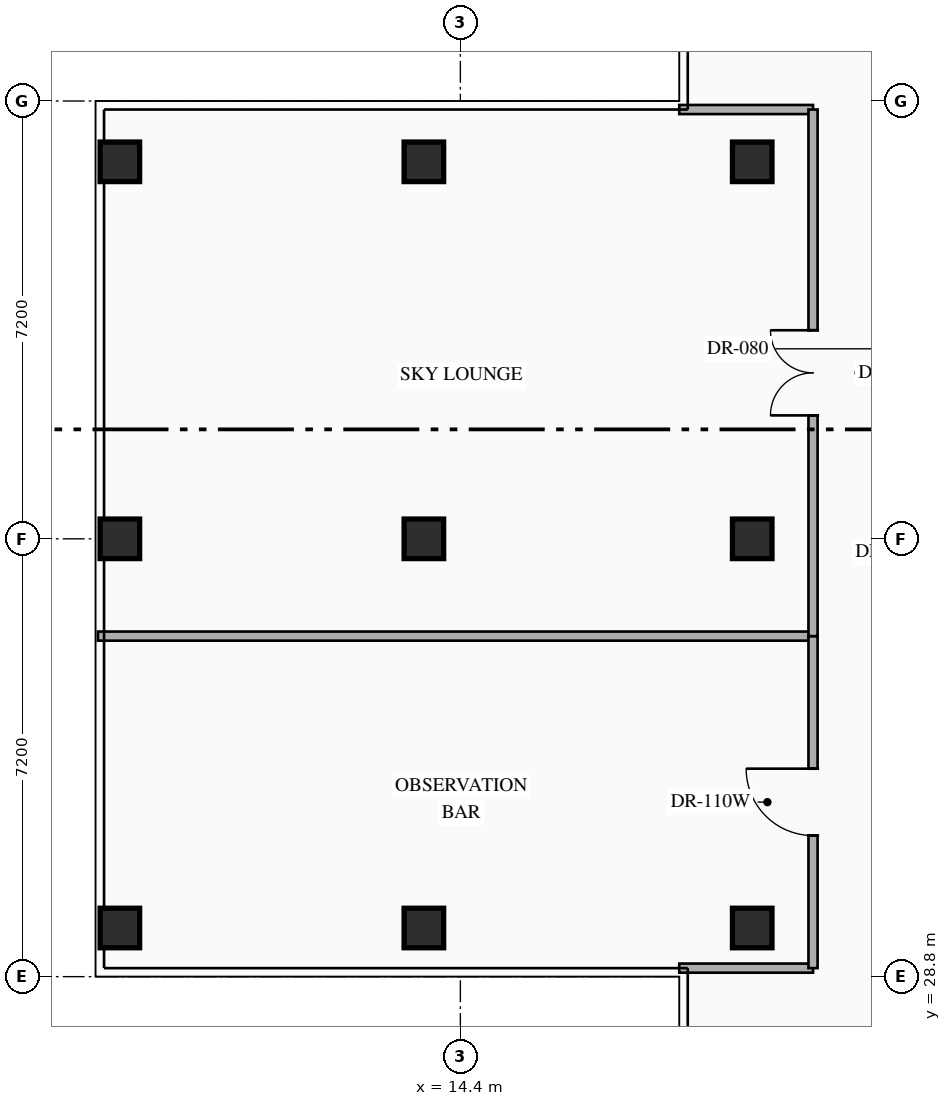
"""IFC4 building model, lengths in metres.
Left out: names, types, materials, properties, quantities, classifications, styles, units other than length and angle.
Written with IfcOpenShell. Run it as: python <this file> out.ifc"""

import sys

from ifc_helpers import new_model, si_unit, direction, frame, frame_2d, origin, origin_2d, place, context, subcontext, project, spatial, rectangle, hollow_rectangle, extrude, element, fill, save


model = new_model("IFC4")
c1 = context("Model", 3, precision=1e-05, world=origin(), true_north=direction((0.0, 1.0)))
c2 = subcontext(c1, "Body", "Model", "MODEL_VIEW")
j1 = project(units=[si_unit("LENGTHUNIT", "METRE"), si_unit("PLANEANGLEUNIT", "RADIAN")], contexts=[c1])
p1 = place(None, origin())
s1 = spatial("IfcSite", under=j1, at=p1, CompositionType="ELEMENT")
p2 = place(p1, origin())
s2 = spatial("IfcBuilding", under=s1, at=p2, CompositionType="ELEMENT")
p3 = place(p2, frame((0.0, 0.0, 261.75)))
s3 = spatial("IfcBuildingStorey", under=s2, at=p3, CompositionType="ELEMENT", Elevation=261.75)
for number, where, z_axis, x_axis in (
    (1, (19.2, 29.6, 0.0), (0.0, 0.0, 1.0), (1.0, 0.0, 0.0)),
    (2, (19.2, 42.2, 0.0), (0.0, 0.0, 1.0), (1.0, 0.0, 0.0)),
    (3, (19.2, 36.0, 0.0), (0.0, 0.0, 1.0), (1.0, 0.0, 0.0)),
):
    element("IfcColumn", number, at=place(p3, frame(where, z_axis=z_axis, x_axis=x_axis)), inside=s3, PredefinedType="COLUMN", context=c2, shape_type="SweptSolid", body=[
        extrude(hollow_rectangle(XDim=0.65, YDim=0.65, WallThickness=0.025, at=origin_2d()), origin(), (0.0, 0.0, 1.0), 4.2),
    ])
for number, where, z_axis, x_axis in (
    (4, (13.8, 29.6, 0.0), (0.0, 0.0, 1.0), (1.0, 0.0, 0.0)),
    (5, (8.8, 29.6, 0.0), (0.0, 0.0, 1.0), (1.0, 0.0, 0.0)),
    (6, (13.8, 36.0, 0.0), (0.0, 0.0, 1.0), (1.0, 0.0, 0.0)),
    (7, (8.8, 36.0, 0.0), (0.0, 0.0, 1.0), (1.0, 0.0, 0.0)),
    (8, (13.8, 42.2, 0.0), (0.0, 0.0, 1.0), (1.0, 0.0, 0.0)),
    (9, (8.8, 42.2, 0.0), (0.0, 0.0, 1.0), (1.0, 0.0, 0.0)),
):
    element("IfcColumn", number, at=place(p3, frame(where, z_axis=z_axis, x_axis=x_axis)), inside=s3, PredefinedType="COLUMN", context=c2, shape_type="SweptSolid", body=[
        extrude(hollow_rectangle(XDim=0.65, YDim=0.65, WallThickness=0.025, at=origin_2d()), origin(), (0.0, 0.0, 1.0), 3.918),
    ])
for number, where, z_axis, x_axis in (
    (10, (18.0, 28.94, 0.0), (0.0, 0.0, 1.0), (1.0, 0.0, 0.0)),
    (11, (18.0, 43.06, 0.0), (0.0, 0.0, 1.0), (1.0, 0.0, 0.0)),
):
    element("IfcWall", number, at=place(p3, frame(where, z_axis=z_axis, x_axis=x_axis)), inside=s3, PredefinedType="PARTITIONING", context=c2, shape_type="SweptSolid", body=[
        extrude(rectangle(XDim=2.2, YDim=0.15, at=frame_2d((1.1, 0.0))), origin(), (0.0, 0.0, 1.0), 3.94),
    ])
p4 = place(p3, frame((8.44, 34.4, 0.0), z_axis=(0.0, 0.0, 1.0), x_axis=(1.0, 0.0, 0.0)))
e12 = element("IfcWall", 12, at=p4, inside=s3, PredefinedType="PARTITIONING", context=c2, shape_type="SweptSolid", body=[
    extrude(rectangle(XDim=11.76, YDim=0.15, at=frame_2d((5.88, 0.0))), origin(), (0.0, 0.0, 1.0), 3.94),
])
p5 = place(p3, frame((20.2, 28.94, 0.0), z_axis=(0.0, 0.0, 1.0), x_axis=(0.0, 1.0, 0.0)))
e13 = element("IfcWall", 13, at=p5, inside=s3, PredefinedType="PARTITIONING", context=c2, shape_type="SweptSolid", body=[
    extrude(rectangle(XDim=5.46, YDim=0.15, at=frame_2d((2.73, 0.0))), origin(), (0.0, 0.0, 1.0), 3.94),
])
p6 = place(p5, frame((2.18, 0.0, 0.0)))
e14 = element("IfcOpeningElement", 14, at=p6, cuts=e13, PredefinedType="OPENING", context=c2, shape_type="SweptSolid", body=[
    extrude(rectangle(XDim=1.1, YDim=2.16, at=frame_2d((0.55, 1.08))), frame((0.0, 0.085, 0.0), z_axis=(0.0, -1.0, 0.0), x_axis=(1.0, 0.0, 0.0)), (0.0, 0.0, 1.0), 0.17),
])
p7 = place(p3, frame((20.2, 34.4, 0.0), z_axis=(0.0, 0.0, 1.0), x_axis=(0.0, 1.0, 0.0)))
e15 = element("IfcWall", 15, at=p7, inside=s3, PredefinedType="PARTITIONING", context=c2, shape_type="SweptSolid", body=[
    extrude(rectangle(XDim=8.66, YDim=0.15, at=frame_2d((4.33, 0.0))), origin(), (0.0, 0.0, 1.0), 3.94),
])
p8 = place(p7, frame((3.63, 0.0, 0.0)))
e16 = element("IfcOpeningElement", 16, at=p8, cuts=e15, PredefinedType="OPENING", context=c2, shape_type="SweptSolid", body=[
    extrude(rectangle(XDim=1.4, YDim=2.3, at=frame_2d((0.7, 1.15))), frame((0.0, 0.085, 0.0), z_axis=(0.0, -1.0, 0.0), x_axis=(1.0, 0.0, 0.0)), (0.0, 0.0, 1.0), 0.17),
])
p9 = place(p6, origin())
e17 = element("IfcDoor", 17, at=p9, inside=s3, OperationType="SINGLE_SWING_RIGHT", PredefinedType="DOOR", context=c2, shape_type="SweptSolid", body=[
    extrude(rectangle(XDim=1.1, YDim=2.16, at=frame_2d((0.55, 1.08))), frame((0.0, 0.025, 0.0), z_axis=(0.0, -1.0, 0.0), x_axis=(1.0, 0.0, 0.0)), (0.0, 0.0, 1.0), 0.05),
])
fill(e14, e17)
p10 = place(p8, origin())
e18 = element("IfcDoor", 18, at=p10, inside=s3, OperationType="DOUBLE_DOOR_SINGLE_SWING", PredefinedType="DOOR", context=c2, shape_type="SweptSolid", body=[
    extrude(rectangle(XDim=1.4, YDim=2.3, at=frame_2d((0.7, 1.15))), frame((0.0, 0.025, 0.0), z_axis=(0.0, -1.0, 0.0), x_axis=(1.0, 0.0, 0.0)), (0.0, 0.0, 1.0), 0.05),
])
fill(e16, e18)
save(model, sys.argv[1])
